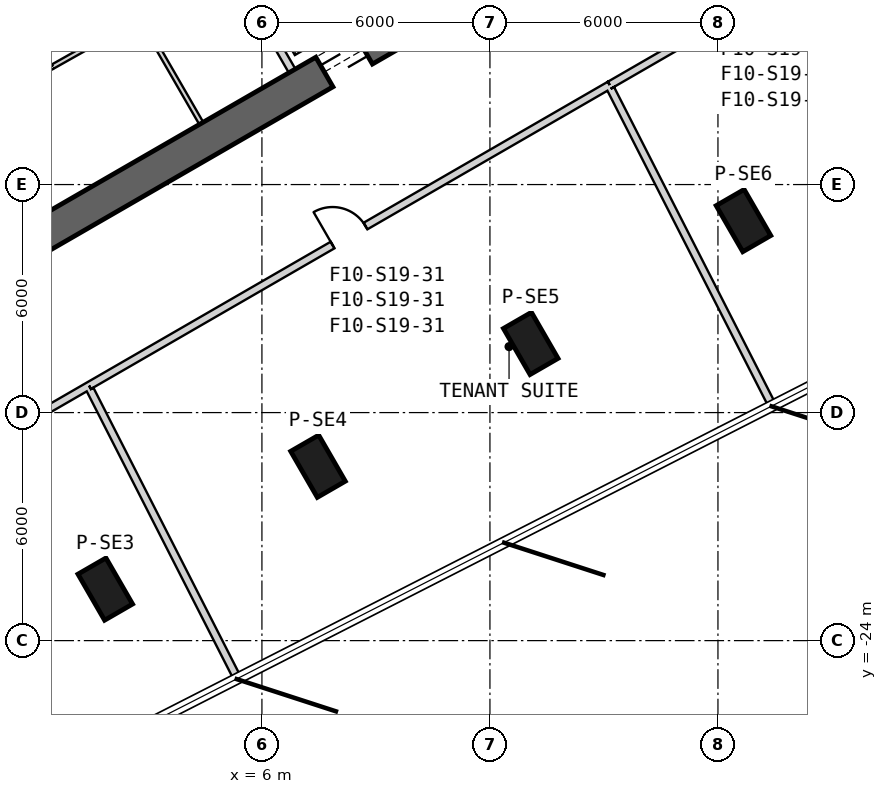
"""IFC4 building model, lengths in metres.
Left out: names, types, materials, properties, quantities, classifications, styles, units other than length and angle.
Written with IfcOpenShell. Run it as: python <this file> out.ifc"""

import sys

from ifc_helpers import new_model, si_unit, direction, frame, frame_2d, origin, origin_2d, place, context, subcontext, project, spatial, rectangle, extrude, element, fill, save


model = new_model("IFC4")
c1 = context("Model", 3, precision=1e-05, world=origin(), true_north=direction((0.0, 1.0)))
c2 = subcontext(c1, "Body", "Model", "MODEL_VIEW")
j1 = project(units=[si_unit("LENGTHUNIT", "METRE"), si_unit("PLANEANGLEUNIT", "RADIAN")], contexts=[c1])
p1 = place(None, origin())
s1 = spatial("IfcSite", under=j1, at=p1, CompositionType="ELEMENT")
p2 = place(p1, origin())
s2 = spatial("IfcBuilding", under=s1, at=p2, CompositionType="ELEMENT")
p3 = place(p2, frame((0.0, 0.0, 310.4)))
s3 = spatial("IfcBuildingStorey", under=s2, at=p3, CompositionType="ELEMENT", Elevation=310.4)
for number, where, z_axis, x_axis in (
    (1, (1.878, -22.644, 0.0), (0.0, 0.0, 1.0), (0.5, -0.866, 0.0)),
    (2, (7.476, -19.412, 0.0), (0.0, 0.0, 1.0), (0.5, -0.866, 0.0)),
    (3, (13.074, -16.18, 0.0), (0.0, 0.0, 1.0), (0.5, -0.866, 0.0)),
    (4, (18.672, -12.948, 0.0), (0.0, 0.0, 1.0), (0.5, -0.866, 0.0)),
):
    element("IfcColumn", number, at=place(p3, frame(where, z_axis=z_axis, x_axis=x_axis)), inside=s3, PredefinedType="COLUMN", context=c2, shape_type="SweptSolid", body=[
        extrude(rectangle(XDim=1.4, YDim=0.85, at=origin_2d()), origin(), (0.0, 0.0, 1.0), 3.9),
    ])
p4 = place(p3, frame((-7.825, -17.97, 0.0), z_axis=(0.0, 0.0, 1.0), x_axis=(0.866028369851, 0.499994862586, 0.0)))
e5 = element("IfcWall", 5, at=p4, inside=s3, PredefinedType="SHEAR", context=c2, shape_type="SweptSolid", body=[
    extrude(rectangle(XDim=31.523, YDim=0.9, at=frame_2d((15.762, 0.0))), origin(), (0.0, 0.0, 1.0), 3.9),
])
p5 = place(p4, frame((17.862, 0.0, 0.0)))
e6 = element("IfcOpeningElement", 6, at=p5, cuts=e5, PredefinedType="OPENING", context=c2, shape_type="SweptSolid", body=[
    extrude(rectangle(XDim=1.2, YDim=2.4, at=frame_2d((0.6, 1.2))), frame((0.0, 0.46, 0.0), z_axis=(0.0, -1.0, 0.0), x_axis=(1.0, 0.0, 0.0)), (0.0, 0.0, 1.0), 0.92),
])
p6 = place(p4, frame((20.562, 0.0, 0.0)))
e7 = element("IfcOpeningElement", 7, at=p6, cuts=e5, PredefinedType="OPENING", context=c2, shape_type="SweptSolid", body=[
    extrude(rectangle(XDim=1.2, YDim=2.4, at=frame_2d((0.6, 1.2))), frame((0.0, 0.46, 0.0), z_axis=(0.0, -1.0, 0.0), x_axis=(1.0, 0.0, 0.0)), (0.0, 0.0, 1.0), 0.92),
])
p7 = place(p4, frame((26.712, 0.0, 0.0)))
e8 = element("IfcOpeningElement", 8, at=p7, cuts=e5, PredefinedType="OPENING", context=c2, shape_type="SweptSolid", body=[
    extrude(rectangle(XDim=1.2, YDim=2.4, at=frame_2d((0.6, 1.2))), frame((0.0, 0.46, 0.0), z_axis=(0.0, -1.0, 0.0), x_axis=(1.0, 0.0, 0.0)), (0.0, 0.0, 1.0), 0.92),
])
p8 = place(p4, frame((3.612, 0.0, 0.0)))
e9 = element("IfcOpeningElement", 9, at=p8, cuts=e5, PredefinedType="OPENING", context=c2, shape_type="SweptSolid", body=[
    extrude(rectangle(XDim=1.2, YDim=2.4, at=frame_2d((0.6, 1.2))), frame((0.0, 0.46, 0.0), z_axis=(0.0, -1.0, 0.0), x_axis=(1.0, 0.0, 0.0)), (0.0, 0.0, 1.0), 0.92),
])
p9 = place(p3, frame((6.795, -9.01, 0.0), z_axis=(0.0, 0.0, 1.0), x_axis=(-0.499984717929, 0.866034226713, 0.0)))
e10 = element("IfcWall", 10, at=p9, inside=s3, PredefinedType="PLUMBINGWALL", context=c2, shape_type="SweptSolid", body=[
    extrude(rectangle(XDim=3.25, YDim=0.2, at=frame_2d((1.625, 0.0))), origin(), (0.0, 0.0, 1.0), 3.6),
])
p10 = place(p3, frame((4.405, -10.389, 0.0), z_axis=(0.0, 0.0, 1.0), x_axis=(-0.500017246033, 0.866015446554, 0.0)))
e11 = element("IfcWall", 11, at=p10, inside=s3, PredefinedType="PARTITIONING", context=c2, shape_type="SweptSolid", body=[
    extrude(rectangle(XDim=3.25, YDim=0.12, at=frame_2d((1.625, 0.0))), origin(), (0.0, 0.0, 1.0), 3.6),
])
p11 = place(p3, frame((0.494, -8.896, 0.0), z_axis=(0.0, 0.0, 1.0), x_axis=(0.871426548871, 0.490526013503, 0.0)))
e12 = element("IfcWall", 12, at=p11, inside=s3, PredefinedType="PARTITIONING", context=c2, shape_type="SweptSolid", body=[
    extrude(rectangle(XDim=2.67, YDim=0.12, at=frame_2d((1.335, 0.0))), origin(), (0.0, 0.0, 1.0), 3.6),
])
p12 = place(p3, frame((0.493, -8.895, 0.0), z_axis=(0.0, 0.0, 1.0), x_axis=(-0.866027945518, -0.499995597562, 0.0)))
e13 = element("IfcWall", 13, at=p12, inside=s3, PredefinedType="PARTITIONING", context=c2, shape_type="SweptSolid", body=[
    extrude(rectangle(XDim=1.702, YDim=0.12, at=frame_2d((0.851, 0.0))), origin(), (0.0, 0.0, 1.0), 3.6),
])
p13 = place(p12, frame((0.461, 0.0, 0.0)))
e14 = element("IfcOpeningElement", 14, at=p13, cuts=e13, PredefinedType="OPENING", context=c2, shape_type="SweptSolid", body=[
    extrude(rectangle(XDim=0.8, YDim=2.1, at=frame_2d((0.4, 1.05))), frame((0.0, 0.07, 0.0), z_axis=(0.0, -1.0, 0.0), x_axis=(1.0, 0.0, 0.0)), (0.0, 0.0, 1.0), 0.14),
])
p14 = place(p3, frame((-6.505, -21.885, 0.0), z_axis=(0.0, 0.0, 1.0), x_axis=(0.8660236234, 0.500003083703, 0.0)))
e15 = element("IfcWall", 15, at=p14, inside=s3, PredefinedType="PARTITIONING", context=c2, shape_type="SweptSolid", body=[
    extrude(rectangle(XDim=9.188, YDim=0.2, at=frame_2d((4.594, 0.0))), origin(), (0.0, 0.0, 1.0), 2.88),
])
p15 = place(p14, frame((4.132, 0.0, 0.0)))
e16 = element("IfcOpeningElement", 16, at=p15, cuts=e15, PredefinedType="OPENING", context=c2, shape_type="SweptSolid", body=[
    extrude(rectangle(XDim=1.0, YDim=2.1, at=frame_2d((0.5, 1.05))), frame((0.0, 0.11, 0.0), z_axis=(0.0, -1.0, 0.0), x_axis=(1.0, 0.0, 0.0)), (0.0, 0.0, 1.0), 0.22),
])
p16 = place(p3, frame((1.451, -17.291, 0.0), z_axis=(0.0, 0.0, 1.0), x_axis=(0.866027540469, 0.499996299136, 0.0)))
e17 = element("IfcWall", 17, at=p16, inside=s3, PredefinedType="PARTITIONING", context=c2, shape_type="SweptSolid", body=[
    extrude(rectangle(XDim=15.82, YDim=0.2, at=frame_2d((7.91, 0.0))), origin(), (0.0, 0.0, 1.0), 2.97),
])
p17 = place(p16, frame((7.399, 0.0, 0.0)))
e18 = element("IfcOpeningElement", 18, at=p17, cuts=e17, PredefinedType="OPENING", context=c2, shape_type="SweptSolid", body=[
    extrude(rectangle(XDim=1.0, YDim=2.1, at=frame_2d((0.5, 1.05))), frame((0.0, 0.11, 0.0), z_axis=(0.0, -1.0, 0.0), x_axis=(1.0, 0.0, 0.0)), (0.0, 0.0, 1.0), 0.22),
])
p18 = place(p3, frame((15.152, -9.381, 0.0), z_axis=(0.0, 0.0, 1.0), x_axis=(0.866019759539, 0.500009775993, 0.0)))
e19 = element("IfcWall", 19, at=p18, inside=s3, PredefinedType="PARTITIONING", context=c2, shape_type="SweptSolid", body=[
    extrude(rectangle(XDim=7.944, YDim=0.2, at=frame_2d((3.972, 0.0))), origin(), (0.0, 0.0, 1.0), 2.88),
])
p19 = place(p18, frame((3.472, 0.0, 0.0)))
e20 = element("IfcOpeningElement", 20, at=p19, cuts=e19, PredefinedType="OPENING", context=c2, shape_type="SweptSolid", body=[
    extrude(rectangle(XDim=1.0, YDim=2.1, at=frame_2d((0.5, 1.05))), frame((0.0, 0.11, 0.0), z_axis=(0.0, -1.0, 0.0), x_axis=(1.0, 0.0, 0.0)), (0.0, 0.0, 1.0), 0.22),
])
p20 = place(p3, frame((15.178, -9.481, 0.0), z_axis=(0.0, 0.0, 1.0), x_axis=(0.454314491878, -0.890841367736, 0.0)))
e21 = element("IfcWall", 21, at=p20, inside=s3, PredefinedType="PARTITIONING", context=c2, shape_type="SweptSolid", body=[
    extrude(rectangle(XDim=9.361, YDim=0.2, at=frame_2d((4.68, 0.0))), origin(), (0.0, 0.0, 1.0), 2.97),
])
p21 = place(p3, frame((5.356, -24.997, 0.0), z_axis=(0.0, 0.0, 1.0), x_axis=(-0.454291135593, 0.890853278672, 0.0)))
e22 = element("IfcWall", 22, at=p21, inside=s3, PredefinedType="PARTITIONING", context=c2, shape_type="SweptSolid", body=[
    extrude(rectangle(XDim=8.538, YDim=0.2, at=frame_2d((4.269, 0.0))), origin(), (0.0, 0.0, 1.0), 2.97),
])
p22 = place(p17, origin())
e23 = element("IfcDoor", 23, at=p22, inside=s3, OperationType="SINGLE_SWING_RIGHT", PredefinedType="USERDEFINED", context=c2, shape_type="SweptSolid", body=[
    extrude(rectangle(XDim=1.0, YDim=2.1, at=frame_2d((0.5, 1.05))), frame((0.0, 0.025, 0.0), z_axis=(0.0, -1.0, 0.0), x_axis=(1.0, 0.0, 0.0)), (0.0, 0.0, 1.0), 0.05),
])
fill(e18, e23)
p23 = place(p5, origin())
e24 = element("IfcDoor", 24, at=p23, inside=s3, OperationType="SLIDING_TO_LEFT", PredefinedType="USERDEFINED", context=c2, shape_type="SweptSolid", body=[
    extrude(rectangle(XDim=1.2, YDim=2.4, at=frame_2d((0.6, 1.2))), frame((0.0, 0.025, 0.0), z_axis=(0.0, -1.0, 0.0), x_axis=(1.0, 0.0, 0.0)), (0.0, 0.0, 1.0), 0.05),
])
fill(e6, e24)
save(model, sys.argv[1])
